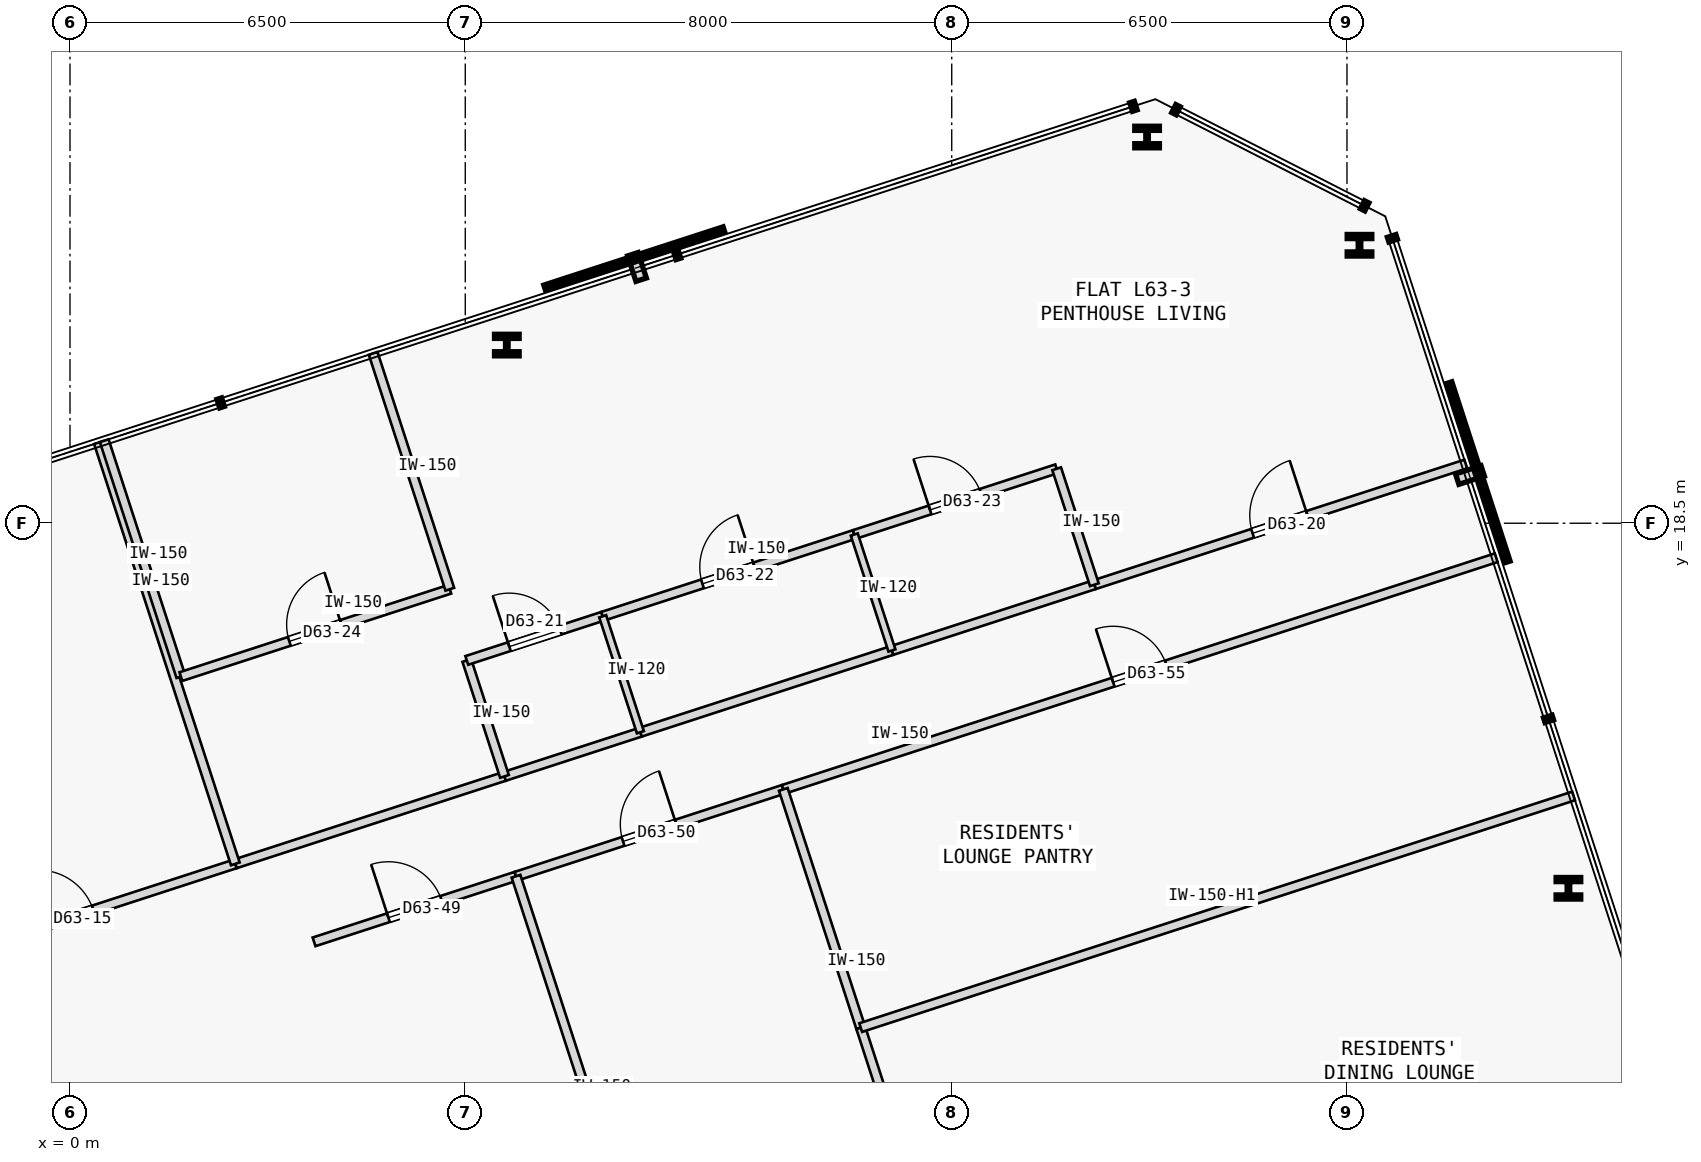
"""IFC4 building model, lengths in metres.
Left out: names, types, materials, properties, quantities, classifications, styles, units other than length and angle.
Written with IfcOpenShell. Run it as: python <this file> out.ifc"""

import sys

from ifc_helpers import new_model, si_unit, direction, frame, frame_2d, origin, origin_2d, place, context, subcontext, project, spatial, rectangle, i_section, extrude, element, fill, save


model = new_model("IFC4")
c1 = context("Model", 3, precision=1e-05, world=origin(), true_north=direction((0.0, 1.0)))
c2 = subcontext(c1, "Body", "Model", "MODEL_VIEW")
j1 = project(units=[si_unit("LENGTHUNIT", "METRE"), si_unit("PLANEANGLEUNIT", "RADIAN")], contexts=[c1])
p1 = place(None, origin())
s1 = spatial("IfcSite", under=j1, at=p1, CompositionType="ELEMENT")
p2 = place(p1, origin())
s2 = spatial("IfcBuilding", under=s1, at=p2, CompositionType="ELEMENT")
p3 = place(p2, frame((0.0, 0.0, 237.7)))
s3 = spatial("IfcBuildingStorey", under=s2, at=p3, CompositionType="ELEMENT", Elevation=237.7)
for number, where, z_axis, x_axis in (
    (1, (24.642, 12.497, 0.0), (0.0, 0.0, 1.0), (1.0, 0.0, 0.0)),
    (2, (21.206, 23.071, 0.0), (0.0, 0.0, 1.0), (1.0, 0.0, 0.0)),
    (3, (17.713, 24.851, 0.0), (0.0, 0.0, 1.0), (1.0, 0.0, 0.0)),
    (4, (7.184, 21.43, 0.0), (0.0, 0.0, 1.0), (1.0, 0.0, 0.0)),
):
    element("IfcColumn", number, at=place(p3, frame(where, z_axis=z_axis, x_axis=x_axis)), inside=s3, PredefinedType="COLUMN", context=c2, shape_type="SweptSolid", body=[
        extrude(i_section(OverallWidth=0.405, OverallDepth=0.355, WebThickness=0.042, FlangeThickness=0.068, FilletRadius=0.015, at=origin_2d()), origin(), (0.0, 0.0, 1.0), 3.35),
    ])
p4 = place(p3, frame((-2.856, 11.087, 0.0), z_axis=(0.0, 0.0, 1.0), x_axis=(0.95106314138, 0.308996603718, 0.0)))
e5 = element("IfcWall", 5, at=p4, inside=s3, PredefinedType="PARTITIONING", context=c2, shape_type="SweptSolid", body=[
    extrude(rectangle(XDim=5.862, YDim=0.15, at=frame_2d((2.931, 0.0))), origin(), (0.0, 0.0, 1.0), 3.125),
])
p5 = place(p4, frame((2.456, 0.0, 0.0)))
e6 = element("IfcOpeningElement", 6, at=p5, cuts=e5, PredefinedType="OPENING", context=c2, shape_type="SweptSolid", body=[
    extrude(rectangle(XDim=0.95, YDim=2.15, at=frame_2d((0.475, 1.075))), frame((0.0, 0.085, 0.0), z_axis=(0.0, -1.0, 0.0), x_axis=(1.0, 0.0, 0.0)), (0.0, 0.0, 1.0), 0.17),
])
p6 = place(p3, frame((2.719, 12.898, 0.0), z_axis=(0.0, 0.0, 1.0), x_axis=(0.951053341802, 0.309026764289, 0.0)))
e7 = element("IfcWall", 7, at=p6, inside=s3, PredefinedType="PARTITIONING", context=c2, shape_type="SweptSolid", body=[
    extrude(rectangle(XDim=4.654, YDim=0.15, at=frame_2d((2.327, 0.0))), origin(), (0.0, 0.0, 1.0), 3.125),
])
p7 = place(p3, frame((16.846, 17.489, 0.0), z_axis=(0.0, 0.0, 1.0), x_axis=(0.951062281754, 0.308999249554, 0.0)))
e8 = element("IfcWall", 8, at=p7, inside=s3, PredefinedType="PARTITIONING", context=c2, shape_type="SweptSolid", body=[
    extrude(rectangle(XDim=6.422, YDim=0.15, at=frame_2d((3.211, 0.0))), origin(), (0.0, 0.0, 1.0), 3.125),
])
p8 = place(p7, frame((2.736, 0.0, 0.0)))
e9 = element("IfcOpeningElement", 9, at=p8, cuts=e8, PredefinedType="OPENING", context=c2, shape_type="SweptSolid", body=[
    extrude(rectangle(XDim=0.95, YDim=2.15, at=frame_2d((0.475, 1.075))), frame((0.0, 0.085, 0.0), z_axis=(0.0, -1.0, 0.0), x_axis=(1.0, 0.0, 0.0)), (0.0, 0.0, 1.0), 0.17),
])
p9 = place(p3, frame((7.145, 14.337, 0.0), z_axis=(0.0, 0.0, 1.0), x_axis=(0.951045519245, 0.309050837767, 0.0)))
e10 = element("IfcWall", 10, at=p9, inside=s3, PredefinedType="PARTITIONING", context=c2, shape_type="SweptSolid", body=[
    extrude(rectangle(XDim=2.35, YDim=0.15, at=frame_2d((1.175, 0.0))), origin(), (0.0, 0.0, 1.0), 3.125),
])
p10 = place(p3, frame((9.38, 15.063, 0.0), z_axis=(0.0, 0.0, 1.0), x_axis=(0.951069122051, 0.308978195154, 0.0)))
e11 = element("IfcWall", 11, at=p10, inside=s3, PredefinedType="PARTITIONING", context=c2, shape_type="SweptSolid", body=[
    extrude(rectangle(XDim=4.35, YDim=0.15, at=frame_2d((2.175, 0.0))), origin(), (0.0, 0.0, 1.0), 3.125),
])
p11 = place(p3, frame((13.517, 16.407, 0.0), z_axis=(0.0, 0.0, 1.0), x_axis=(0.951041757107, 0.309062414796, 0.0)))
e12 = element("IfcWall", 12, at=p11, inside=s3, PredefinedType="PARTITIONING", context=c2, shape_type="SweptSolid", body=[
    extrude(rectangle(XDim=3.5, YDim=0.15, at=frame_2d((1.75, 0.0))), origin(), (0.0, 0.0, 1.0), 3.125),
])
p12 = place(p3, frame((4.013, 11.616, 0.0), z_axis=(0.0, 0.0, 1.0), x_axis=(0.951054104561, 0.309024416831, 0.0)))
e13 = element("IfcWall", 13, at=p12, inside=s3, PredefinedType="PARTITIONING", context=c2, shape_type="SweptSolid", body=[
    extrude(rectangle(XDim=3.492, YDim=0.15, at=frame_2d((1.746, 0.0))), origin(), (0.0, 0.0, 1.0), 3.125),
])
p13 = place(p12, frame((1.286, 0.0, 0.0)))
e14 = element("IfcOpeningElement", 14, at=p13, cuts=e13, PredefinedType="OPENING", context=c2, shape_type="SweptSolid", body=[
    extrude(rectangle(XDim=0.92, YDim=2.15, at=frame_2d((0.46, 1.075))), frame((0.0, 0.085, 0.0), z_axis=(0.0, -1.0, 0.0), x_axis=(1.0, 0.0, 0.0)), (0.0, 0.0, 1.0), 0.17),
])
p14 = place(p3, frame((7.334, 12.695, 0.0), z_axis=(0.0, 0.0, 1.0), x_axis=(0.951043772533, 0.30905621289, 0.0)))
e15 = element("IfcWall", 15, at=p14, inside=s3, PredefinedType="PARTITIONING", context=c2, shape_type="SweptSolid", body=[
    extrude(rectangle(XDim=4.622, YDim=0.15, at=frame_2d((2.311, 0.0))), origin(), (0.0, 0.0, 1.0), 3.125),
])
p15 = place(p14, frame((1.851, 0.0, 0.0)))
e16 = element("IfcOpeningElement", 16, at=p15, cuts=e15, PredefinedType="OPENING", context=c2, shape_type="SweptSolid", body=[
    extrude(rectangle(XDim=0.92, YDim=2.15, at=frame_2d((0.46, 1.075))), frame((0.0, 0.085, 0.0), z_axis=(0.0, -1.0, 0.0), x_axis=(1.0, 0.0, 0.0)), (0.0, 0.0, 1.0), 0.17),
])
p16 = place(p3, frame((11.73, 14.123, 0.0), z_axis=(0.0, 0.0, 1.0), x_axis=(0.951060263663, 0.309005460926, 0.0)))
e17 = element("IfcWall", 17, at=p16, inside=s3, PredefinedType="PARTITIONING", context=c2, shape_type="SweptSolid", body=[
    extrude(rectangle(XDim=12.327, YDim=0.15, at=frame_2d((6.164, 0.0))), origin(), (0.0, 0.0, 1.0), 3.125),
])
p17 = place(p16, frame((5.704, 0.0, 0.0)))
e18 = element("IfcOpeningElement", 18, at=p17, cuts=e17, PredefinedType="OPENING", context=c2, shape_type="SweptSolid", body=[
    extrude(rectangle(XDim=0.92, YDim=2.15, at=frame_2d((0.46, 1.075))), frame((0.0, 0.085, 0.0), z_axis=(0.0, -1.0, 0.0), x_axis=(1.0, 0.0, 0.0)), (0.0, 0.0, 1.0), 0.17),
])
p18 = place(p3, frame((2.719, 12.898, 0.0), z_axis=(0.0, 0.0, 1.0), x_axis=(-0.308998913866, 0.951062390819, 0.0)))
e19 = element("IfcWall", 19, at=p18, inside=s3, PredefinedType="PARTITIONING", context=c2, shape_type="SweptSolid", body=[
    extrude(rectangle(XDim=7.284, YDim=0.15, at=frame_2d((3.642, 0.0))), origin(), (0.0, 0.0, 1.0), 3.125),
])
p19 = place(p3, frame((7.145, 14.337, 0.0), z_axis=(0.0, 0.0, 1.0), x_axis=(-0.308948390121, 0.951078804433, 0.0)))
e20 = element("IfcWall", 20, at=p19, inside=s3, PredefinedType="PARTITIONING", context=c2, shape_type="SweptSolid", body=[
    extrude(rectangle(XDim=2.005, YDim=0.15, at=frame_2d((1.002, 0.0))), origin(), (0.0, 0.0, 1.0), 3.125),
])
p20 = place(p3, frame((6.525, 16.243, 0.0), z_axis=(0.0, 0.0, 1.0), x_axis=(0.951035595692, 0.309081373955, 0.0)))
e21 = element("IfcWall", 21, at=p20, inside=s3, PredefinedType="PARTITIONING", context=c2, shape_type="SweptSolid", body=[
    extrude(rectangle(XDim=2.35, YDim=0.15, at=frame_2d((1.175, 0.0))), origin(), (0.0, 0.0, 1.0), 3.125),
])
p21 = place(p20, frame((0.735, 0.0, 0.0)))
e22 = element("IfcOpeningElement", 22, at=p21, cuts=e21, PredefinedType="OPENING", context=c2, shape_type="SweptSolid", body=[
    extrude(rectangle(XDim=0.88, YDim=2.15, at=frame_2d((0.44, 1.075))), frame((0.0, 0.085, 0.0), z_axis=(0.0, -1.0, 0.0), x_axis=(1.0, 0.0, 0.0)), (0.0, 0.0, 1.0), 0.17),
])
p22 = place(p3, frame((8.76, 16.97, 0.0), z_axis=(0.0, 0.0, 1.0), x_axis=(0.951052627573, 0.309028962374, 0.0)))
e23 = element("IfcWall", 23, at=p22, inside=s3, PredefinedType="PARTITIONING", context=c2, shape_type="SweptSolid", body=[
    extrude(rectangle(XDim=4.35, YDim=0.15, at=frame_2d((2.175, 0.0))), origin(), (0.0, 0.0, 1.0), 3.125),
])
p23 = place(p22, frame((1.725, 0.0, 0.0)))
e24 = element("IfcOpeningElement", 24, at=p23, cuts=e23, PredefinedType="OPENING", context=c2, shape_type="SweptSolid", body=[
    extrude(rectangle(XDim=0.9, YDim=2.15, at=frame_2d((0.45, 1.075))), frame((0.0, 0.085, 0.0), z_axis=(0.0, -1.0, 0.0), x_axis=(1.0, 0.0, 0.0)), (0.0, 0.0, 1.0), 0.17),
])
p24 = place(p3, frame((12.897, 18.314, 0.0), z_axis=(0.0, 0.0, 1.0), x_axis=(0.951062257173, 0.308999325213, 0.0)))
e25 = element("IfcWall", 25, at=p24, inside=s3, PredefinedType="PARTITIONING", context=c2, shape_type="SweptSolid", body=[
    extrude(rectangle(XDim=3.5, YDim=0.15, at=frame_2d((1.75, 0.0))), origin(), (0.0, 0.0, 1.0), 3.125),
])
p25 = place(p24, frame((1.31, 0.0, 0.0)))
e26 = element("IfcOpeningElement", 26, at=p25, cuts=e25, PredefinedType="OPENING", context=c2, shape_type="SweptSolid", body=[
    extrude(rectangle(XDim=0.88, YDim=2.15, at=frame_2d((0.44, 1.075))), frame((0.0, 0.085, 0.0), z_axis=(0.0, -1.0, 0.0), x_axis=(1.0, 0.0, 0.0)), (0.0, 0.0, 1.0), 0.17),
])
p26 = place(p3, frame((16.846, 17.489, 0.0), z_axis=(0.0, 0.0, 1.0), x_axis=(-0.309058537449, 0.951043017129, 0.0)))
e27 = element("IfcWall", 27, at=p26, inside=s3, PredefinedType="PARTITIONING", context=c2, shape_type="SweptSolid", body=[
    extrude(rectangle(XDim=2.005, YDim=0.15, at=frame_2d((1.002, 0.0))), origin(), (0.0, 0.0, 1.0), 3.125),
])
p27 = place(p3, frame((1.823, 15.978, 0.0), z_axis=(0.0, 0.0, 1.0), x_axis=(-0.309018403393, 0.951056058476, 0.0)))
e28 = element("IfcWall", 28, at=p27, inside=s3, PredefinedType="PARTITIONING", context=c2, shape_type="SweptSolid", body=[
    extrude(rectangle(XDim=4.079, YDim=0.15, at=frame_2d((2.04, 0.0))), origin(), (0.0, 0.0, 1.0), 3.125),
])
p28 = place(p3, frame((1.823, 15.978, 0.0), z_axis=(0.0, 0.0, 1.0), x_axis=(0.951050272606, 0.309036209813, 0.0)))
e29 = element("IfcWall", 29, at=p28, inside=s3, PredefinedType="PARTITIONING", context=c2, shape_type="SweptSolid", body=[
    extrude(rectangle(XDim=4.65, YDim=0.15, at=frame_2d((2.325, 0.0))), origin(), (0.0, 0.0, 1.0), 3.125),
])
p29 = place(p28, frame((1.875, 0.0, 0.0)))
e30 = element("IfcOpeningElement", 30, at=p29, cuts=e29, PredefinedType="OPENING", context=c2, shape_type="SweptSolid", body=[
    extrude(rectangle(XDim=0.9, YDim=2.15, at=frame_2d((0.45, 1.075))), frame((0.0, 0.085, 0.0), z_axis=(0.0, -1.0, 0.0), x_axis=(1.0, 0.0, 0.0)), (0.0, 0.0, 1.0), 0.17),
])
p30 = place(p3, frame((6.246, 17.415, 0.0), z_axis=(0.0, 0.0, 1.0), x_axis=(-0.308981853652, 0.95106793349, 0.0)))
e31 = element("IfcWall", 31, at=p30, inside=s3, PredefinedType="PARTITIONING", context=c2, shape_type="SweptSolid", body=[
    extrude(rectangle(XDim=4.079, YDim=0.15, at=frame_2d((2.039, 0.0))), origin(), (0.0, 0.0, 1.0), 3.125),
])
p31 = place(p3, frame((9.38, 15.063, 0.0), z_axis=(0.0, 0.0, 1.0), x_axis=(-0.309058537449, 0.951043017129, 0.0)))
e32 = element("IfcWall", 32, at=p31, inside=s3, PredefinedType="PARTITIONING", context=c2, shape_type="SweptSolid", body=[
    extrude(rectangle(XDim=2.005, YDim=0.12, at=frame_2d((1.002, 0.0))), origin(), (0.0, 0.0, 1.0), 3.125),
])
p32 = place(p3, frame((13.517, 16.407, 0.0), z_axis=(0.0, 0.0, 1.0), x_axis=(-0.309022749039, 0.951054646472, 0.0)))
e33 = element("IfcWall", 33, at=p32, inside=s3, PredefinedType="PARTITIONING", context=c2, shape_type="SweptSolid", body=[
    extrude(rectangle(XDim=2.005, YDim=0.12, at=frame_2d((1.002, 0.0))), origin(), (0.0, 0.0, 1.0), 3.125),
])
p33 = place(p3, frame((9.64, 5.6, 0.0), z_axis=(0.0, 0.0, 1.0), x_axis=(-0.309012069377, 0.95105811651, 0.0)))
e34 = element("IfcWall", 34, at=p33, inside=s3, PredefinedType="PARTITIONING", context=c2, shape_type="SweptSolid", body=[
    extrude(rectangle(XDim=7.46, YDim=0.15, at=frame_2d((3.73, 0.0))), origin(), (0.0, 0.0, 1.0), 3.125),
])
p34 = place(p3, frame((14.5, 5.6, 0.0), z_axis=(0.0, 0.0, 1.0), x_axis=(-0.308974360462, 0.951070367837, 0.0)))
e35 = element("IfcWall", 35, at=p34, inside=s3, PredefinedType="PARTITIONING", context=c2, shape_type="SweptSolid", body=[
    extrude(rectangle(XDim=4.843, YDim=0.15, at=frame_2d((2.421, 0.0))), origin(), (0.0, 0.0, 1.0), 3.125),
])
p35 = place(p3, frame((13.003, 10.206, 0.0), z_axis=(0.0, 0.0, 1.0), x_axis=(-0.309035144366, 0.951050618814, 0.0)))
e36 = element("IfcWall", 36, at=p35, inside=s3, PredefinedType="PARTITIONING", context=c2, shape_type="SweptSolid", body=[
    extrude(rectangle(XDim=4.119, YDim=0.15, at=frame_2d((2.06, 0.0))), origin(), (0.0, 0.0, 1.0), 3.125),
])
p36 = place(p3, frame((13.003, 10.206, 0.0), z_axis=(0.0, 0.0, 1.0), x_axis=(0.951060263663, 0.309005460926, 0.0)))
e37 = element("IfcWall", 37, at=p36, inside=s3, PredefinedType="PARTITIONING", context=c2, shape_type="SweptSolid", body=[
    extrude(rectangle(XDim=12.327, YDim=0.15, at=frame_2d((6.164, 0.0))), origin(), (0.0, 0.0, 1.0), 2.675),
])
p37 = place(p5, origin())
e38 = element("IfcDoor", 38, at=p37, inside=s3, OperationType="SINGLE_SWING_LEFT", PredefinedType="DOOR", context=c2, shape_type="SweptSolid", body=[
    extrude(rectangle(XDim=0.95, YDim=2.15, at=frame_2d((0.475, 1.075))), frame((0.0, 0.025, 0.0), z_axis=(0.0, -1.0, 0.0), x_axis=(1.0, 0.0, 0.0)), (0.0, 0.0, 1.0), 0.05),
])
fill(e6, e38)
p38 = place(p8, origin())
e39 = element("IfcDoor", 39, at=p38, inside=s3, OperationType="SINGLE_SWING_RIGHT", PredefinedType="DOOR", context=c2, shape_type="SweptSolid", body=[
    extrude(rectangle(XDim=0.95, YDim=2.15, at=frame_2d((0.475, 1.075))), frame((0.0, 0.025, 0.0), z_axis=(0.0, -1.0, 0.0), x_axis=(1.0, 0.0, 0.0)), (0.0, 0.0, 1.0), 0.05),
])
fill(e9, e39)
p39 = place(p21, origin())
e40 = element("IfcDoor", 40, at=p39, inside=s3, OperationType="SINGLE_SWING_LEFT", PredefinedType="DOOR", context=c2, shape_type="SweptSolid", body=[
    extrude(rectangle(XDim=0.88, YDim=2.15, at=frame_2d((0.44, 1.075))), frame((0.0, 0.025, 0.0), z_axis=(0.0, -1.0, 0.0), x_axis=(1.0, 0.0, 0.0)), (0.0, 0.0, 1.0), 0.05),
])
fill(e22, e40)
p40 = place(p23, origin())
e41 = element("IfcDoor", 41, at=p40, inside=s3, OperationType="SINGLE_SWING_RIGHT", PredefinedType="DOOR", context=c2, shape_type="SweptSolid", body=[
    extrude(rectangle(XDim=0.9, YDim=2.15, at=frame_2d((0.45, 1.075))), frame((0.0, 0.025, 0.0), z_axis=(0.0, -1.0, 0.0), x_axis=(1.0, 0.0, 0.0)), (0.0, 0.0, 1.0), 0.05),
])
fill(e24, e41)
p41 = place(p25, origin())
e42 = element("IfcDoor", 42, at=p41, inside=s3, OperationType="SINGLE_SWING_LEFT", PredefinedType="DOOR", context=c2, shape_type="SweptSolid", body=[
    extrude(rectangle(XDim=0.88, YDim=2.15, at=frame_2d((0.44, 1.075))), frame((0.0, 0.025, 0.0), z_axis=(0.0, -1.0, 0.0), x_axis=(1.0, 0.0, 0.0)), (0.0, 0.0, 1.0), 0.05),
])
fill(e26, e42)
p42 = place(p29, origin())
e43 = element("IfcDoor", 43, at=p42, inside=s3, OperationType="SINGLE_SWING_RIGHT", PredefinedType="DOOR", context=c2, shape_type="SweptSolid", body=[
    extrude(rectangle(XDim=0.9, YDim=2.15, at=frame_2d((0.45, 1.075))), frame((0.0, 0.025, 0.0), z_axis=(0.0, -1.0, 0.0), x_axis=(1.0, 0.0, 0.0)), (0.0, 0.0, 1.0), 0.05),
])
fill(e30, e43)
p43 = place(p13, origin())
e44 = element("IfcDoor", 44, at=p43, inside=s3, OperationType="SINGLE_SWING_LEFT", PredefinedType="DOOR", context=c2, shape_type="SweptSolid", body=[
    extrude(rectangle(XDim=0.92, YDim=2.15, at=frame_2d((0.46, 1.075))), frame((0.0, 0.025, 0.0), z_axis=(0.0, -1.0, 0.0), x_axis=(1.0, 0.0, 0.0)), (0.0, 0.0, 1.0), 0.05),
])
fill(e14, e44)
p44 = place(p15, origin())
e45 = element("IfcDoor", 45, at=p44, inside=s3, OperationType="SINGLE_SWING_RIGHT", PredefinedType="DOOR", context=c2, shape_type="SweptSolid", body=[
    extrude(rectangle(XDim=0.92, YDim=2.15, at=frame_2d((0.46, 1.075))), frame((0.0, 0.025, 0.0), z_axis=(0.0, -1.0, 0.0), x_axis=(1.0, 0.0, 0.0)), (0.0, 0.0, 1.0), 0.05),
])
fill(e16, e45)
p45 = place(p17, origin())
e46 = element("IfcDoor", 46, at=p45, inside=s3, OperationType="SINGLE_SWING_LEFT", PredefinedType="DOOR", context=c2, shape_type="SweptSolid", body=[
    extrude(rectangle(XDim=0.92, YDim=2.15, at=frame_2d((0.46, 1.075))), frame((0.0, 0.025, 0.0), z_axis=(0.0, -1.0, 0.0), x_axis=(1.0, 0.0, 0.0)), (0.0, 0.0, 1.0), 0.05),
])
fill(e18, e46)
save(model, sys.argv[1])
